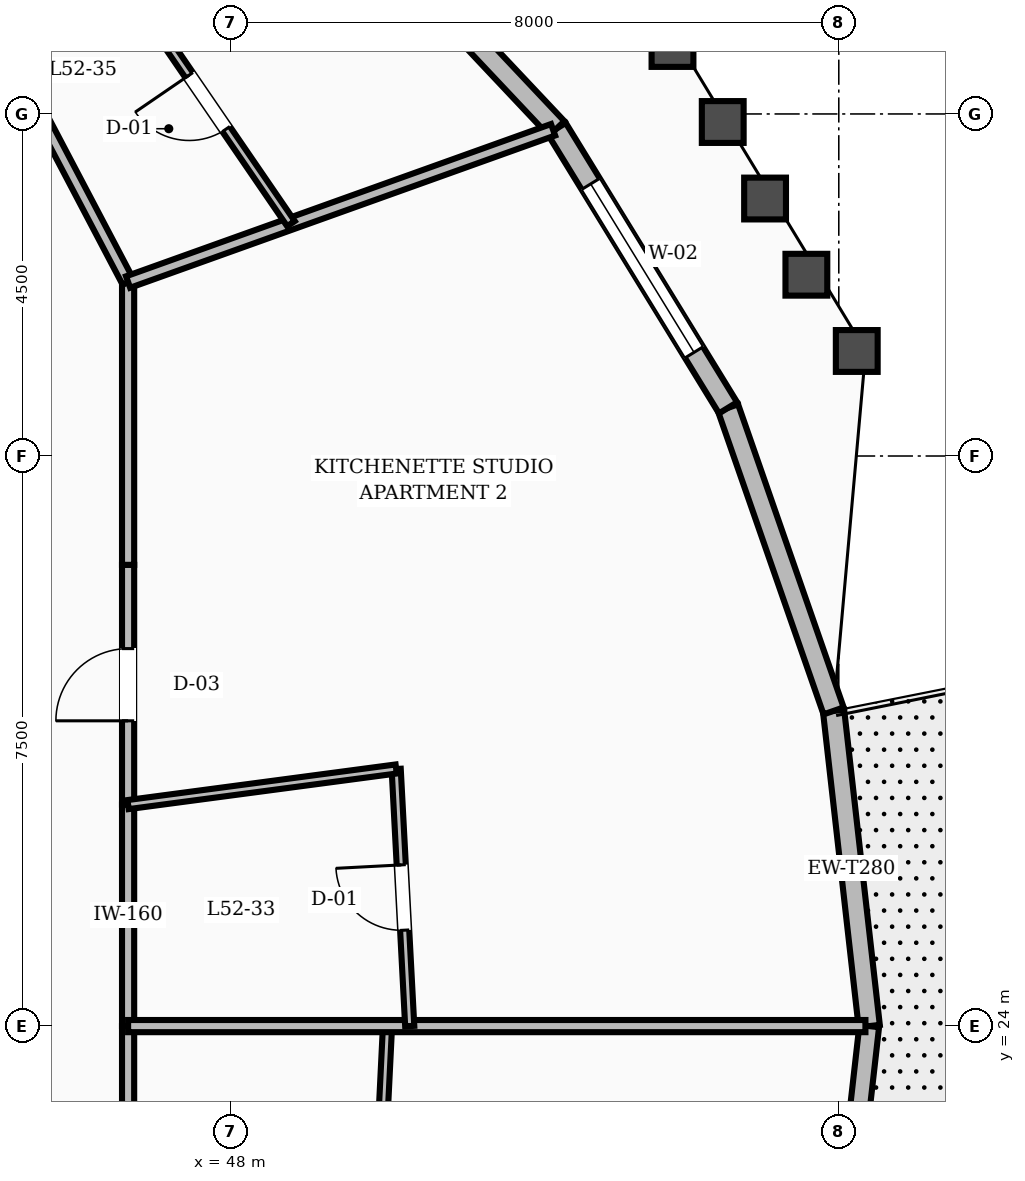
"""IFC4 building model, lengths in metres.
Left out: names, types, materials, properties, quantities, classifications, styles, units other than length and angle.
Written with IfcOpenShell. Run it as: python <this file> out.ifc"""

import sys

from ifc_helpers import new_model, si_unit, direction, frame, frame_2d, origin, place, context, subcontext, project, spatial, rectangle, extrude, element, fill, save


model = new_model("IFC4")
c1 = context("Model", 3, precision=1e-05, world=origin(), true_north=direction((0.0, 1.0)))
c2 = subcontext(c1, "Body", "Model", "MODEL_VIEW")
j1 = project(units=[si_unit("LENGTHUNIT", "METRE"), si_unit("PLANEANGLEUNIT", "RADIAN")], contexts=[c1])
p1 = place(None, origin())
s1 = spatial("IfcSite", under=j1, at=p1, CompositionType="ELEMENT")
p2 = place(p1, origin())
s2 = spatial("IfcBuilding", under=s1, at=p2, CompositionType="ELEMENT")
p3 = place(p2, frame((0.0, 0.0, 200.0)))
s3 = spatial("IfcBuildingStorey", under=s2, at=p3, CompositionType="ELEMENT", Elevation=200.0)
p4 = place(p3, frame((56.4, 24.0, 0.0), z_axis=(0.0, 0.0, 1.0), x_axis=(-0.112325534702, 0.99367146193, 0.0)))
e1 = element("IfcWall", 1, at=p4, inside=s3, PredefinedType="STANDARD", context=c2, shape_type="SweptSolid", body=[
    extrude(rectangle(XDim=4.173, YDim=0.28, at=frame_2d((2.086, 0.0))), origin(), (0.0, 0.0, 1.0), 2.77),
])
p5 = place(p3, frame((55.932, 28.147, 0.0), z_axis=(0.0, 0.0, 1.0), x_axis=(-0.328845805233, 0.94438362776, 0.0)))
e2 = element("IfcWall", 2, at=p5, inside=s3, PredefinedType="STANDARD", context=c2, shape_type="SweptSolid", body=[
    extrude(rectangle(XDim=4.222, YDim=0.28, at=frame_2d((2.111, 0.0))), origin(), (0.0, 0.0, 1.0), 2.77),
])
p6 = place(p3, frame((54.543, 32.134, 0.0), z_axis=(0.0, 0.0, 1.0), x_axis=(-0.522997521468, 0.852334202375, 0.0)))
e3 = element("IfcWall", 3, at=p6, inside=s3, PredefinedType="STANDARD", context=c2, shape_type="SweptSolid", body=[
    extrude(rectangle(XDim=4.312, YDim=0.28, at=frame_2d((2.156, 0.0))), origin(), (0.0, 0.0, 1.0), 2.77),
])
p7 = place(p6, frame((0.856, 0.0, 0.8)))
e4 = element("IfcOpeningElement", 4, at=p7, cuts=e3, PredefinedType="OPENING", context=c2, shape_type="SweptSolid", body=[
    extrude(rectangle(XDim=2.6, YDim=1.65, at=frame_2d((1.3, 0.825))), frame((0.0, 0.15, 0.0), z_axis=(0.0, -1.0, 0.0), x_axis=(1.0, 0.0, 0.0)), (0.0, 0.0, 1.0), 0.3),
])
p8 = place(p3, frame((52.288, 35.809, 0.0), z_axis=(0.0, 0.0, 1.0), x_axis=(-0.685717407763, 0.727867870352, 0.0)))
e5 = element("IfcWall", 5, at=p8, inside=s3, PredefinedType="STANDARD", context=c2, shape_type="SweptSolid", body=[
    extrude(rectangle(XDim=4.425, YDim=0.28, at=frame_2d((2.213, 0.0))), origin(), (0.0, 0.0, 1.0), 2.77),
])
p9 = place(p3, frame((55.915, 19.703, 0.0), z_axis=(0.0, 0.0, 1.0), x_axis=(0.112302837685, 0.993674027359, 0.0)))
e6 = element("IfcWall", 6, at=p9, inside=s3, PredefinedType="STANDARD", context=c2, shape_type="SweptSolid", body=[
    extrude(rectangle(XDim=4.324, YDim=0.26, at=frame_2d((2.162, 0.0))), origin(), (0.0, 0.0, 1.0), 2.77),
])
p10 = place(p9, frame((1.688, 0.0, 0.0)))
e7 = element("IfcOpeningElement", 7, at=p10, cuts=e6, PredefinedType="OPENING", context=c2, shape_type="SweptSolid", body=[
    extrude(rectangle(XDim=1.1, YDim=2.15, at=frame_2d((0.55, 1.075))), frame((0.0, 0.14, 0.0), z_axis=(0.0, -1.0, 0.0), x_axis=(1.0, 0.0, 0.0)), (0.0, 0.0, 1.0), 0.28),
])
p11 = place(p3, frame((46.65, 24.0, 0.0), z_axis=(0.0, 0.0, 1.0), x_axis=(0.0, 1.0, 0.0)))
e8 = element("IfcWall", 8, at=p11, inside=s3, PredefinedType="SOLIDWALL", context=c2, shape_type="SweptSolid", body=[
    extrude(rectangle(XDim=2.914, YDim=0.16, at=frame_2d((1.457, 0.0))), origin(), (0.0, 0.0, 1.0), 2.75),
])
p12 = place(p3, frame((46.65, 26.914, 0.0), z_axis=(0.0, 0.0, 1.0), x_axis=(0.0, 1.0, 0.0)))
e9 = element("IfcWall", 9, at=p12, inside=s3, PredefinedType="SOLIDWALL", context=c2, shape_type="SweptSolid", body=[
    extrude(rectangle(XDim=3.154, YDim=0.16, at=frame_2d((1.577, 0.0))), origin(), (0.0, 0.0, 1.0), 2.75),
])
p13 = place(p12, frame((1.102, 0.0, 0.0)))
e10 = element("IfcOpeningElement", 10, at=p13, cuts=e9, PredefinedType="OPENING", context=c2, shape_type="SweptSolid", body=[
    extrude(rectangle(XDim=0.95, YDim=2.1, at=frame_2d((0.475, 1.05))), frame((0.0, 0.09, 0.0), z_axis=(0.0, -1.0, 0.0), x_axis=(1.0, 0.0, 0.0)), (0.0, 0.0, 1.0), 0.18),
])
p14 = place(p3, frame((46.65, 30.068, 0.0), z_axis=(0.0, 0.0, 1.0), x_axis=(0.0, 1.0, 0.0)))
e11 = element("IfcWall", 11, at=p14, inside=s3, PredefinedType="SOLIDWALL", context=c2, shape_type="SweptSolid", body=[
    extrude(rectangle(XDim=3.721, YDim=0.16, at=frame_2d((1.86, 0.0))), origin(), (0.0, 0.0, 1.0), 2.75),
])
p15 = place(p3, frame((46.65, 33.789, 0.0), z_axis=(0.0, 0.0, 1.0), x_axis=(-0.46527115782, 0.885168204185, 0.0)))
e12 = element("IfcWall", 12, at=p15, inside=s3, PredefinedType="SOLIDWALL", context=c2, shape_type="SweptSolid", body=[
    extrude(rectangle(XDim=3.6, YDim=0.16, at=frame_2d((1.8, 0.0))), origin(), (0.0, 0.0, 1.0), 2.75),
])
p16 = place(p3, frame((46.65, 21.086, 0.0), z_axis=(0.0, 0.0, 1.0), x_axis=(0.0, 1.0, 0.0)))
e13 = element("IfcWall", 13, at=p16, inside=s3, PredefinedType="SOLIDWALL", context=c2, shape_type="SweptSolid", body=[
    extrude(rectangle(XDim=2.914, YDim=0.16, at=frame_2d((1.457, 0.0))), origin(), (0.0, 0.0, 1.0), 2.75),
])
p17 = place(p3, frame((49.899, 20.655, 0.0), z_axis=(0.0, 0.0, 1.0), x_axis=(0.048981492316, 0.998799686329, 0.0)))
e14 = element("IfcWall", 14, at=p17, inside=s3, PredefinedType="PARTITIONING", context=c2, shape_type="SweptSolid", body=[
    extrude(rectangle(XDim=3.349, YDim=0.12, at=frame_2d((1.675, 0.0))), origin(), (0.0, 0.0, 1.0), 2.75),
])
p18 = place(p3, frame((46.65, 24.0, 0.0), z_axis=(0.0, 0.0, 1.0), x_axis=(1.0, 0.0, 0.0)))
e15 = element("IfcWall", 15, at=p18, inside=s3, PredefinedType="SOLIDWALL", context=c2, shape_type="SweptSolid", body=[
    extrude(rectangle(XDim=9.701, YDim=0.16, at=frame_2d((4.85, 0.0))), origin(), (0.0, 0.0, 1.0), 2.75),
])
p19 = place(p3, frame((50.355, 24.0, 0.0), z_axis=(0.0, 0.0, 1.0), x_axis=(-0.052615578061, 0.99861484114, 0.0)))
e16 = element("IfcWall", 16, at=p19, inside=s3, PredefinedType="PARTITIONING", context=c2, shape_type="SweptSolid", body=[
    extrude(rectangle(XDim=3.387, YDim=0.12, at=frame_2d((1.694, 0.0))), origin(), (0.0, 0.0, 1.0), 2.75),
])
p20 = place(p19, frame((1.264, 0.0, 0.0)))
e17 = element("IfcOpeningElement", 17, at=p20, cuts=e16, PredefinedType="OPENING", context=c2, shape_type="SweptSolid", body=[
    extrude(rectangle(XDim=0.86, YDim=2.1, at=frame_2d((0.43, 1.05))), frame((0.0, 0.07, 0.0), z_axis=(0.0, -1.0, 0.0), x_axis=(1.0, 0.0, 0.0)), (0.0, 0.0, 1.0), 0.14),
])
p21 = place(p3, frame((46.65, 26.914, 0.0), z_axis=(0.0, 0.0, 1.0), x_axis=(0.991293099507, 0.131673804801, 0.0)))
e18 = element("IfcWall", 18, at=p21, inside=s3, PredefinedType="PARTITIONING", context=c2, shape_type="SweptSolid", body=[
    extrude(rectangle(XDim=3.558, YDim=0.12, at=frame_2d((1.779, 0.0))), origin(), (0.0, 0.0, 1.0), 2.75),
])
p22 = place(p3, frame((46.65, 33.789, 0.0), z_axis=(0.0, 0.0, 1.0), x_axis=(0.941406646074, 0.33727366741, 0.0)))
e19 = element("IfcWall", 19, at=p22, inside=s3, PredefinedType="SOLIDWALL", context=c2, shape_type="SweptSolid", body=[
    extrude(rectangle(XDim=5.939, YDim=0.16, at=frame_2d((2.97, 0.0))), origin(), (0.0, 0.0, 1.0), 2.75),
])
p23 = place(p3, frame((48.792, 34.556, 0.0), z_axis=(0.0, 0.0, 1.0), x_axis=(-0.56513068161, 0.825001401637, 0.0)))
e20 = element("IfcWall", 20, at=p23, inside=s3, PredefinedType="PARTITIONING", context=c2, shape_type="SweptSolid", body=[
    extrude(rectangle(XDim=3.878, YDim=0.12, at=frame_2d((1.939, 0.0))), origin(), (0.0, 0.0, 1.0), 2.75),
])
p24 = place(p23, frame((1.509, 0.0, 0.0)))
e21 = element("IfcOpeningElement", 21, at=p24, cuts=e20, PredefinedType="OPENING", context=c2, shape_type="SweptSolid", body=[
    extrude(rectangle(XDim=0.86, YDim=2.1, at=frame_2d((0.43, 1.05))), frame((0.0, 0.07, 0.0), z_axis=(0.0, -1.0, 0.0), x_axis=(1.0, 0.0, 0.0)), (0.0, 0.0, 1.0), 0.14),
])
p25 = place(p7, origin())
e22 = element("IfcWindow", 22, at=p25, inside=s3, PartitioningType="SINGLE_PANEL", PredefinedType="WINDOW", context=c2, shape_type="SweptSolid", body=[
    extrude(rectangle(XDim=2.6, YDim=1.65, at=frame_2d((1.3, 0.825))), frame((0.0, 0.03, 0.0), z_axis=(0.0, -1.0, 0.0), x_axis=(1.0, 0.0, 0.0)), (0.0, 0.0, 1.0), 0.06),
])
fill(e4, e22)
p26 = place(p20, origin())
e23 = element("IfcDoor", 23, at=p26, inside=s3, OperationType="SINGLE_SWING_RIGHT", PredefinedType="DOOR", context=c2, shape_type="SweptSolid", body=[
    extrude(rectangle(XDim=0.86, YDim=2.1, at=frame_2d((0.43, 1.05))), frame((0.0, 0.025, 0.0), z_axis=(0.0, -1.0, 0.0), x_axis=(1.0, 0.0, 0.0)), (0.0, 0.0, 1.0), 0.05),
])
fill(e17, e23)
p27 = place(p13, origin())
e24 = element("IfcDoor", 24, at=p27, inside=s3, OperationType="SINGLE_SWING_LEFT", PredefinedType="DOOR", context=c2, shape_type="SweptSolid", body=[
    extrude(rectangle(XDim=0.95, YDim=2.1, at=frame_2d((0.475, 1.05))), frame((0.0, 0.025, 0.0), z_axis=(0.0, -1.0, 0.0), x_axis=(1.0, 0.0, 0.0)), (0.0, 0.0, 1.0), 0.05),
])
fill(e10, e24)
p28 = place(p24, origin())
e25 = element("IfcDoor", 25, at=p28, inside=s3, OperationType="SINGLE_SWING_RIGHT", PredefinedType="DOOR", context=c2, shape_type="SweptSolid", body=[
    extrude(rectangle(XDim=0.86, YDim=2.1, at=frame_2d((0.43, 1.05))), frame((0.0, 0.025, 0.0), z_axis=(0.0, -1.0, 0.0), x_axis=(1.0, 0.0, 0.0)), (0.0, 0.0, 1.0), 0.05),
])
fill(e21, e25)
save(model, sys.argv[1])
